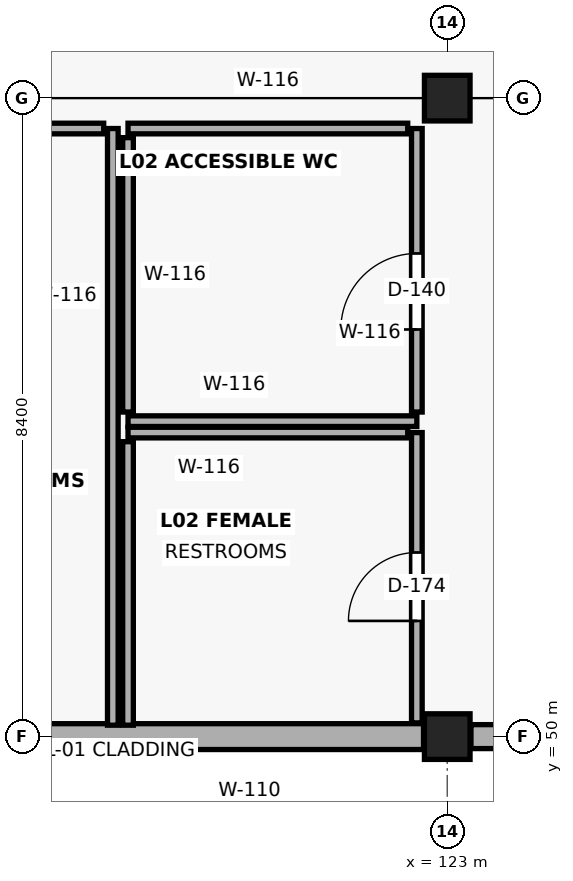
"""IFC4 building model, lengths in metres.
Left out: names, types, materials, properties, quantities, classifications, styles, units other than length and angle.
Written with IfcOpenShell. Run it as: python <this file> out.ifc"""

import sys

from ifc_helpers import new_model, si_unit, direction, frame, frame_2d, origin, origin_2d, place, context, subcontext, project, spatial, rectangle, extrude, element, fill, save


model = new_model("IFC4")
c1 = context("Model", 3, precision=1e-05, world=origin(), true_north=direction((0.0, 1.0)))
c2 = subcontext(c1, "Body", "Model", "MODEL_VIEW")
j1 = project(units=[si_unit("LENGTHUNIT", "METRE"), si_unit("PLANEANGLEUNIT", "RADIAN")], contexts=[c1])
p1 = place(None, origin())
s1 = spatial("IfcSite", under=j1, at=p1, CompositionType="ELEMENT")
p2 = place(p1, origin())
s2 = spatial("IfcBuilding", under=s1, at=p2, CompositionType="ELEMENT")
p3 = place(p2, frame((0.0, 0.0, 9.9)))
s3 = spatial("IfcBuildingStorey", under=s2, at=p3, CompositionType="ELEMENT", Elevation=9.9)
for number, where, z_axis, x_axis in (
    (1, (123.0, 50.0, 0.0), (0.0, 0.0, 1.0), (1.0, 0.0, 0.0)),
    (2, (123.0, 58.4, 0.0), (0.0, 0.0, 1.0), (1.0, 0.0, 0.0)),
):
    element("IfcColumn", number, at=place(p3, frame(where, z_axis=z_axis, x_axis=x_axis)), inside=s3, PredefinedType="COLUMN", context=c2, shape_type="SweptSolid", body=[
        extrude(rectangle(XDim=0.6, YDim=0.6, at=origin_2d()), origin(), (0.0, 0.0, 1.0), 4.5),
    ])
p4 = place(p3, frame((122.688, 50.0, 0.0), z_axis=(0.0, 0.0, 1.0), x_axis=(-1.0, 0.0, 0.0)))
e3 = element("IfcWall", 3, at=p4, inside=s3, PredefinedType="SOLIDWALL", context=c2, shape_type="SweptSolid", body=[
    extrude(rectangle(XDim=8.176, YDim=0.34, at=frame_2d((4.088, 0.0))), origin(), (0.0, 0.0, 1.0), 3.395),
])
p5 = place(p3, frame((131.488, 50.0, 0.0), z_axis=(0.0, 0.0, 1.0), x_axis=(-1.0, 0.0, 0.0)))
e4 = element("IfcWall", 4, at=p5, inside=s3, PredefinedType="SOLIDWALL", context=c2, shape_type="SweptSolid", body=[
    extrude(rectangle(XDim=8.176, YDim=0.315, at=frame_2d((4.088, 0.0))), origin(), (0.0, 0.0, 1.0), 3.395),
])
p6 = place(p5, frame((2.688, 0.0, 0.85)))
e5 = element("IfcOpeningElement", 5, at=p6, cuts=e4, PredefinedType="OPENING", context=c2, shape_type="SweptSolid", body=[
    extrude(rectangle(XDim=2.8, YDim=2.45, at=frame_2d((1.4, 1.225))), frame((0.0, 0.169, 0.0), z_axis=(0.0, -1.0, 0.0), x_axis=(1.0, 0.0, 0.0)), (0.0, 0.0, 1.0), 0.339),
])
p7 = place(p3, frame((118.6, 50.15, 0.0), z_axis=(0.0, 0.0, 1.0), x_axis=(0.0, 1.0, 0.0)))
e6 = element("IfcWall", 6, at=p7, inside=s3, PredefinedType="PLUMBINGWALL", context=c2, shape_type="SweptSolid", body=[
    extrude(rectangle(XDim=7.85, YDim=0.14, at=frame_2d((3.925, 0.0))), origin(), (0.0, 0.0, 1.0), 4.255),
])
p8 = place(p3, frame((118.48, 58.0, 0.0), z_axis=(0.0, 0.0, 1.0), x_axis=(-1.0, 0.0, 0.0)))
e7 = element("IfcWall", 7, at=p8, inside=s3, PredefinedType="PLUMBINGWALL", context=c2, shape_type="SweptSolid", body=[
    extrude(rectangle(XDim=3.88, YDim=0.14, at=frame_2d((1.94, 0.0))), origin(), (0.0, 0.0, 1.0), 4.255),
])
p9 = place(p8, frame((1.03, 0.0, 0.0)))
e8 = element("IfcOpeningElement", 8, at=p9, cuts=e7, PredefinedType="OPENING", context=c2, shape_type="SweptSolid", body=[
    extrude(rectangle(XDim=0.9, YDim=2.15, at=frame_2d((0.45, 1.075))), frame((0.0, 0.082, 0.0), z_axis=(0.0, -1.0, 0.0), x_axis=(1.0, 0.0, 0.0)), (0.0, 0.0, 1.0), 0.164),
])
p10 = place(p3, frame((122.6, 50.181, 0.0), z_axis=(0.0, 0.0, 1.0), x_axis=(0.0, 1.0, 0.0)))
e9 = element("IfcWall", 9, at=p10, inside=s3, PredefinedType="PLUMBINGWALL", context=c2, shape_type="SweptSolid", body=[
    extrude(rectangle(XDim=3.819, YDim=0.14, at=frame_2d((1.91, 0.0))), origin(), (0.0, 0.0, 1.0), 4.255),
])
p11 = place(p10, frame((1.342, 0.0, 0.0)))
e10 = element("IfcOpeningElement", 10, at=p11, cuts=e9, PredefinedType="OPENING", context=c2, shape_type="SweptSolid", body=[
    extrude(rectangle(XDim=0.9, YDim=2.15, at=frame_2d((0.45, 1.075))), frame((0.0, 0.082, 0.0), z_axis=(0.0, -1.0, 0.0), x_axis=(1.0, 0.0, 0.0)), (0.0, 0.0, 1.0), 0.164),
])
p12 = place(p3, frame((122.48, 54.0, 0.0), z_axis=(0.0, 0.0, 1.0), x_axis=(-1.0, 0.0, 0.0)))
e11 = element("IfcWall", 11, at=p12, inside=s3, PredefinedType="PLUMBINGWALL", context=c2, shape_type="SweptSolid", body=[
    extrude(rectangle(XDim=3.68, YDim=0.14, at=frame_2d((1.84, 0.0))), origin(), (0.0, 0.0, 1.0), 4.255),
])
p13 = place(p3, frame((118.8, 53.88, 0.0), z_axis=(0.0, 0.0, 1.0), x_axis=(0.0, -1.0, 0.0)))
e12 = element("IfcWall", 12, at=p13, inside=s3, PredefinedType="PLUMBINGWALL", context=c2, shape_type="SweptSolid", body=[
    extrude(rectangle(XDim=3.73, YDim=0.14, at=frame_2d((1.865, 0.0))), origin(), (0.0, 0.0, 1.0), 4.255),
])
p14 = place(p3, frame((118.8, 54.15, 0.0), z_axis=(0.0, 0.0, 1.0), x_axis=(1.0, 0.0, 0.0)))
e13 = element("IfcWall", 13, at=p14, inside=s3, PredefinedType="PLUMBINGWALL", context=c2, shape_type="SweptSolid", body=[
    extrude(rectangle(XDim=3.8, YDim=0.14, at=frame_2d((1.9, 0.0))), origin(), (0.0, 0.0, 1.0), 4.255),
])
p15 = place(p3, frame((122.6, 54.27, 0.0), z_axis=(0.0, 0.0, 1.0), x_axis=(0.0, 1.0, 0.0)))
e14 = element("IfcWall", 14, at=p15, inside=s3, PredefinedType="PLUMBINGWALL", context=c2, shape_type="SweptSolid", body=[
    extrude(rectangle(XDim=3.73, YDim=0.14, at=frame_2d((1.865, 0.0))), origin(), (0.0, 0.0, 1.0), 4.255),
])
p16 = place(p15, frame((1.086, 0.0, 0.0)))
e15 = element("IfcOpeningElement", 15, at=p16, cuts=e14, PredefinedType="OPENING", context=c2, shape_type="SweptSolid", body=[
    extrude(rectangle(XDim=1.0, YDim=2.15, at=frame_2d((0.5, 1.075))), frame((0.0, 0.082, 0.0), z_axis=(0.0, -1.0, 0.0), x_axis=(1.0, 0.0, 0.0)), (0.0, 0.0, 1.0), 0.164),
])
p17 = place(p3, frame((122.48, 58.0, 0.0), z_axis=(0.0, 0.0, 1.0), x_axis=(-1.0, 0.0, 0.0)))
e16 = element("IfcWall", 16, at=p17, inside=s3, PredefinedType="PLUMBINGWALL", context=c2, shape_type="SweptSolid", body=[
    extrude(rectangle(XDim=3.68, YDim=0.14, at=frame_2d((1.84, 0.0))), origin(), (0.0, 0.0, 1.0), 4.255),
])
p18 = place(p3, frame((118.8, 57.88, 0.0), z_axis=(0.0, 0.0, 1.0), x_axis=(0.0, -1.0, 0.0)))
e17 = element("IfcWall", 17, at=p18, inside=s3, PredefinedType="PLUMBINGWALL", context=c2, shape_type="SweptSolid", body=[
    extrude(rectangle(XDim=3.61, YDim=0.14, at=frame_2d((1.805, 0.0))), origin(), (0.0, 0.0, 1.0), 4.255),
])
p19 = place(p11, origin())
e18 = element("IfcDoor", 18, at=p19, inside=s3, OperationType="SINGLE_SWING_LEFT", PredefinedType="DOOR", context=c2, shape_type="SweptSolid", body=[
    extrude(rectangle(XDim=0.9, YDim=2.15, at=frame_2d((0.45, 1.075))), frame((0.0, 0.025, 0.0), z_axis=(0.0, -1.0, 0.0), x_axis=(1.0, 0.0, 0.0)), (0.0, 0.0, 1.0), 0.05),
])
fill(e10, e18)
p20 = place(p16, origin())
e19 = element("IfcDoor", 19, at=p20, inside=s3, OperationType="SINGLE_SWING_LEFT", PredefinedType="DOOR", context=c2, shape_type="SweptSolid", body=[
    extrude(rectangle(XDim=1.0, YDim=2.15, at=frame_2d((0.5, 1.075))), frame((0.0, 0.025, 0.0), z_axis=(0.0, -1.0, 0.0), x_axis=(1.0, 0.0, 0.0)), (0.0, 0.0, 1.0), 0.05),
])
fill(e15, e19)
save(model, sys.argv[1])
